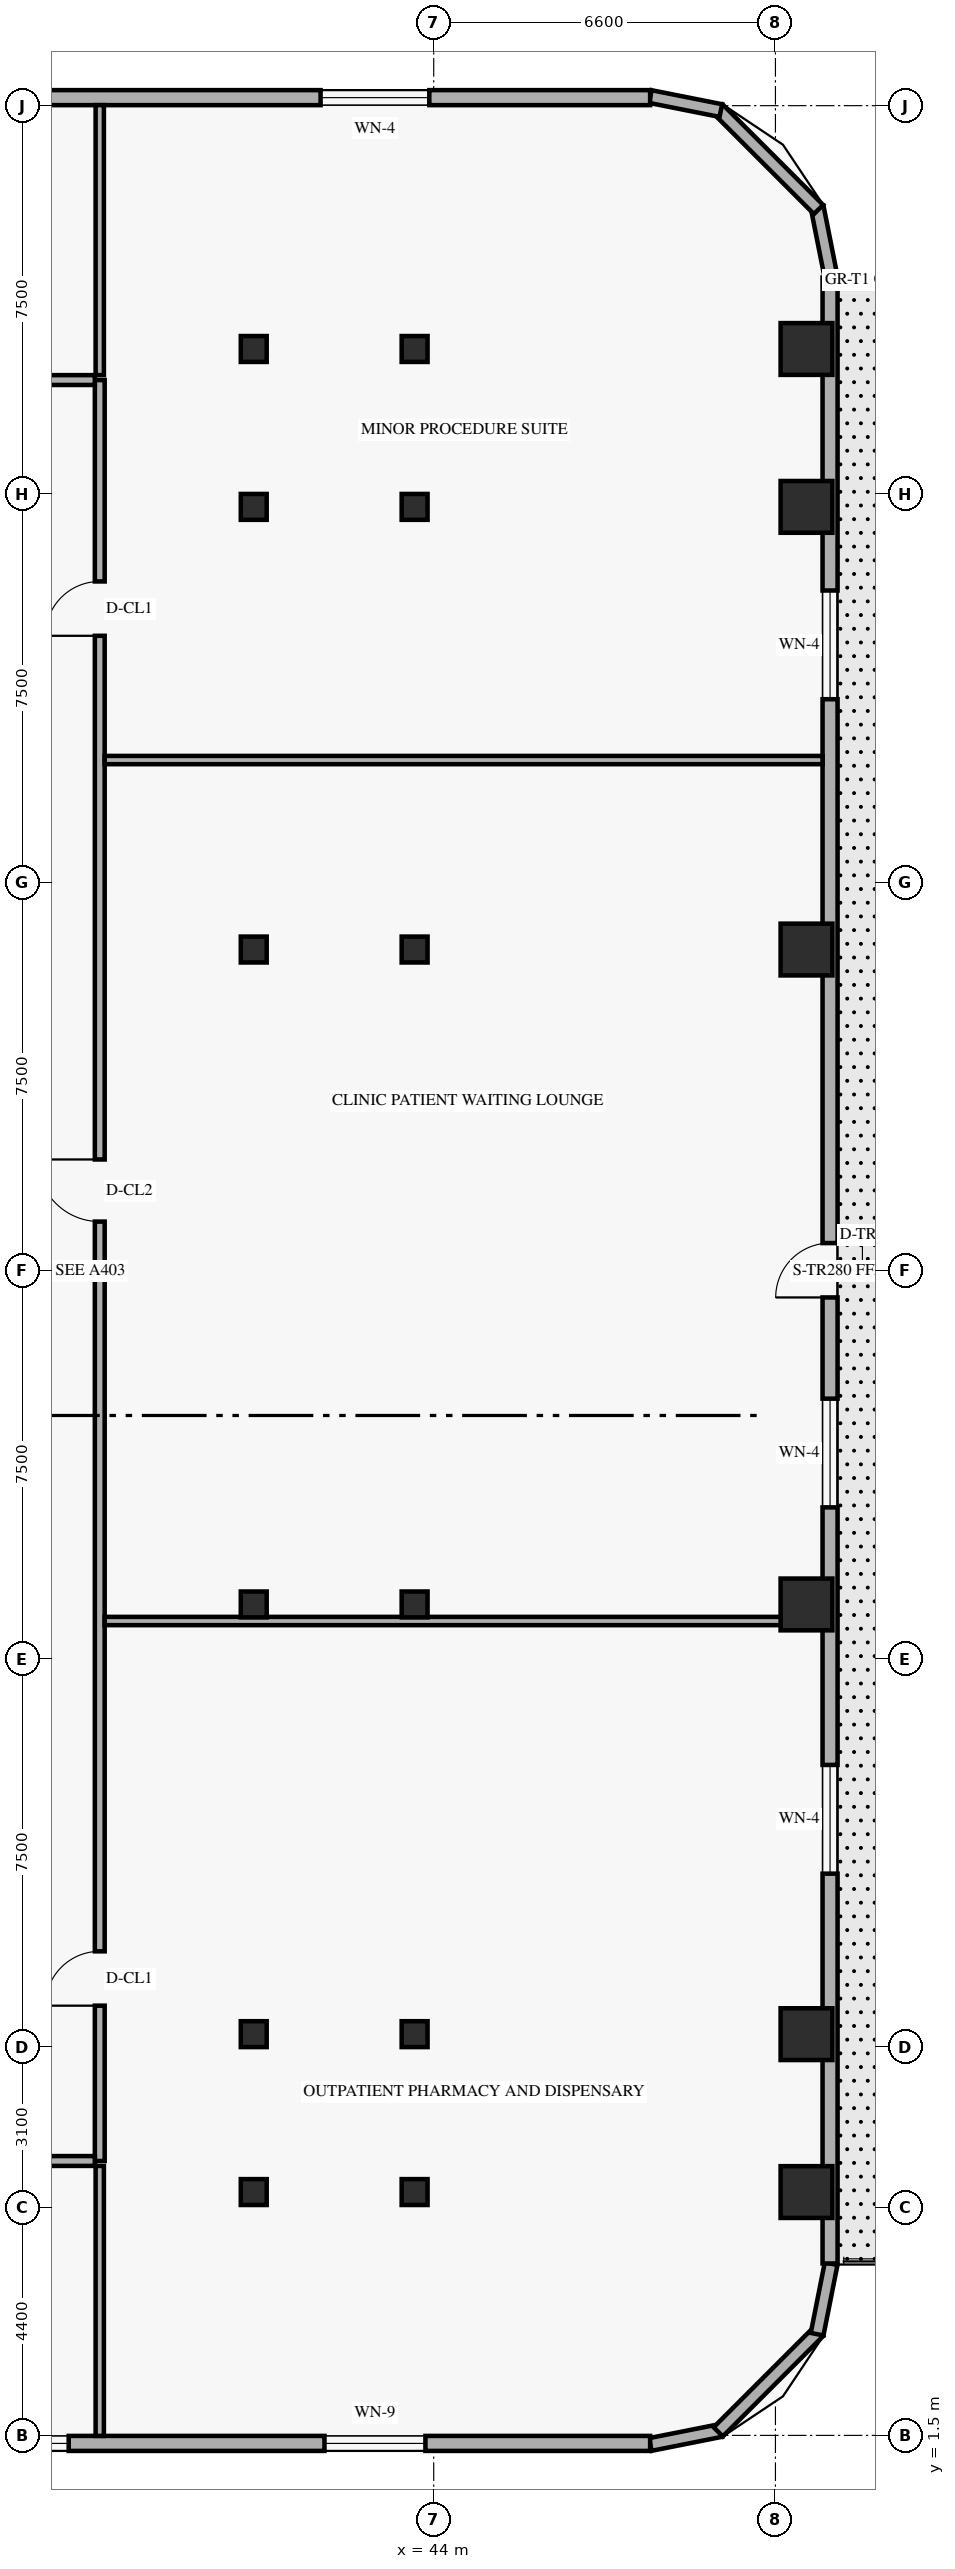
"""IFC4 building model, lengths in metres.
Left out: names, types, materials, properties, quantities, classifications, styles, units other than length and angle.
Written with IfcOpenShell. Run it as: python <this file> out.ifc"""

import sys

from ifc_helpers import new_model, si_unit, direction, frame, frame_2d, origin, origin_2d, place, context, subcontext, project, spatial, rectangle, hollow_rectangle, extrude, element, fill, save


model = new_model("IFC4")
c1 = context("Model", 3, precision=1e-05, world=origin(), true_north=direction((0.0, 1.0)))
c2 = subcontext(c1, "Body", "Model", "MODEL_VIEW")
j1 = project(units=[si_unit("LENGTHUNIT", "METRE"), si_unit("PLANEANGLEUNIT", "RADIAN")], contexts=[c1])
p1 = place(None, origin())
s1 = spatial("IfcSite", under=j1, at=p1, CompositionType="ELEMENT")
p2 = place(p1, origin())
s2 = spatial("IfcBuilding", under=s1, at=p2, CompositionType="ELEMENT")
p3 = place(p2, frame((0.0, 0.0, 14.4)))
s3 = spatial("IfcBuildingStorey", under=s2, at=p3, CompositionType="ELEMENT", Elevation=14.4)
for number, where, z_axis, x_axis in (
    (1, (40.44, 6.2, 0.0), (0.035, 0.0, 0.999), (0.0, 1.0, 0.0)),
    (2, (40.44, 9.25, 0.0), (0.035, 0.0, 0.999), (0.0, 1.0, 0.0)),
    (3, (40.44, 17.55, 0.0), (0.035, 0.0, 0.999), (0.0, 1.0, 0.0)),
    (4, (40.44, 30.2, 0.0), (0.035, 0.0, 0.999), (0.0, 1.0, 0.0)),
    (5, (40.44, 38.75, 0.0), (0.035, 0.0, 0.999), (0.0, 1.0, 0.0)),
    (6, (40.44, 41.8, 0.0), (0.035, 0.0, 0.999), (0.0, 1.0, 0.0)),
):
    element("IfcColumn", number, at=place(p3, frame(where, z_axis=z_axis, x_axis=x_axis)), inside=s3, PredefinedType="COLUMN", context=c2, shape_type="SweptSolid", body=[
        extrude(hollow_rectangle(XDim=0.5, YDim=0.5, WallThickness=0.022, at=origin_2d()), origin(), (0.0, 0.0, 1.0), 4.803),
    ])
for number, where, z_axis, x_axis in (
    (7, (43.492, 6.2, 0.0), (0.058, 0.0, 0.998), (0.0, 1.0, 0.0)),
    (8, (43.492, 9.25, 0.0), (0.058, 0.0, 0.998), (0.0, 1.0, 0.0)),
    (9, (43.492, 17.55, 0.0), (0.058, 0.0, 0.998), (0.0, 1.0, 0.0)),
    (10, (43.492, 30.2, 0.0), (0.058, 0.0, 0.998), (0.0, 1.0, 0.0)),
    (11, (43.492, 38.75, 0.0), (0.058, 0.0, 0.998), (0.0, 1.0, 0.0)),
    (12, (43.492, 41.8, 0.0), (0.058, 0.0, 0.998), (0.0, 1.0, 0.0)),
):
    element("IfcColumn", number, at=place(p3, frame(where, z_axis=z_axis, x_axis=x_axis)), inside=s3, PredefinedType="COLUMN", context=c2, shape_type="SweptSolid", body=[
        extrude(hollow_rectangle(XDim=0.5, YDim=0.5, WallThickness=0.022, at=origin_2d()), origin(), (0.0, 0.0, 1.0), 4.808),
    ])
for number, where, z_axis, x_axis in (
    (13, (51.2, 6.2, 0.0), (0.0, 0.0, 1.0), (1.0, 0.0, 0.0)),
    (14, (51.2, 9.25, 0.0), (0.0, 0.0, 1.0), (1.0, 0.0, 0.0)),
    (15, (51.2, 17.55, 0.0), (0.0, 0.0, 1.0), (1.0, 0.0, 0.0)),
    (16, (51.2, 30.2, 0.0), (0.0, 0.0, 1.0), (1.0, 0.0, 0.0)),
    (17, (51.2, 38.75, 0.0), (0.0, 0.0, 1.0), (1.0, 0.0, 0.0)),
    (18, (51.2, 41.8, 0.0), (0.0, 0.0, 1.0), (1.0, 0.0, 0.0)),
):
    element("IfcColumn", number, at=place(p3, frame(where, z_axis=z_axis, x_axis=x_axis)), inside=s3, PredefinedType="COLUMN", context=c2, shape_type="SweptSolid", body=[
        extrude(rectangle(XDim=1.0, YDim=1.0, at=origin_2d()), origin(), (0.0, 0.0, 1.0), 4.8),
    ])
p4 = place(p3, frame((48.184, 1.324, 0.0), z_axis=(0.0, 0.0, 1.0), x_axis=(0.980803214965, 0.195000137217, 0.0)))
e19 = element("IfcWall", 19, at=p4, inside=s3, PredefinedType="SOLIDWALL", context=c2, shape_type="SweptSolid", body=[
    extrude(rectangle(XDim=1.388, YDim=0.25, at=frame_2d((0.694, 0.0))), origin(), (0.0, 0.0, 1.0), 4.39),
])
p5 = place(p3, frame((49.495, 1.568, 0.0), z_axis=(0.0, 0.0, 1.0), x_axis=(0.707106781187, 0.707106781187, 0.0)))
e20 = element("IfcWall", 20, at=p5, inside=s3, PredefinedType="SOLIDWALL", context=c2, shape_type="SweptSolid", body=[
    extrude(rectangle(XDim=2.739, YDim=0.25, at=frame_2d((1.37, 0.0))), origin(), (0.0, 0.0, 1.0), 4.39),
])
for number, where, z_axis, x_axis in (
    (21, (51.405, 3.455, 0.0), (0.0, 0.0, 1.0), (0.195, 0.981, 0.0)),
    (22, (51.676, 43.184, 0.0), (0.0, 0.0, 1.0), (-0.195, 0.981, 0.0)),
):
    element("IfcWall", number, at=place(p3, frame(where, z_axis=z_axis, x_axis=x_axis)), inside=s3, PredefinedType="SOLIDWALL", context=c2, shape_type="SweptSolid", body=[
        extrude(rectangle(XDim=1.388, YDim=0.25, at=frame_2d((0.694, 0.0))), origin(), (0.0, 0.0, 1.0), 4.39),
    ])
p6 = place(p3, frame((51.432, 44.495, 0.0), z_axis=(0.0, 0.0, 1.0), x_axis=(-0.707106781187, 0.707106781187, 0.0)))
e23 = element("IfcWall", 23, at=p6, inside=s3, PredefinedType="SOLIDWALL", context=c2, shape_type="SweptSolid", body=[
    extrude(rectangle(XDim=2.739, YDim=0.25, at=frame_2d((1.37, 0.0))), origin(), (0.0, 0.0, 1.0), 4.39),
])
p7 = place(p3, frame((49.545, 46.405, 0.0), z_axis=(0.0, 0.0, 1.0), x_axis=(-0.980803214965, 0.195000137217, 0.0)))
e24 = element("IfcWall", 24, at=p7, inside=s3, PredefinedType="SOLIDWALL", context=c2, shape_type="SweptSolid", body=[
    extrude(rectangle(XDim=1.388, YDim=0.25, at=frame_2d((0.694, 0.0))), origin(), (0.0, 0.0, 1.0), 4.39),
])
p8 = place(p3, frame((34.4, 1.345, 0.0), z_axis=(0.0, 0.0, 1.0), x_axis=(1.0, 0.0, 0.0)))
e25 = element("IfcWall", 25, at=p8, inside=s3, PredefinedType="SOLIDWALL", context=c2, shape_type="SweptSolid", body=[
    extrude(rectangle(XDim=13.78, YDim=0.29, at=frame_2d((6.89, 0.0))), origin(), (0.0, 0.0, 1.0), 4.39),
])
p9 = place(p8, frame((0.6, 0.0, 0.85)))
e26 = element("IfcOpeningElement", 26, at=p9, cuts=e25, PredefinedType="OPENING", context=c2, shape_type="SweptSolid", body=[
    extrude(rectangle(XDim=1.95, YDim=1.75, at=frame_2d((0.975, 0.875))), frame((0.0, 0.155, 0.0), z_axis=(0.0, -1.0, 0.0), x_axis=(1.0, 0.0, 0.0)), (0.0, 0.0, 1.0), 0.31),
])
p10 = place(p8, frame((7.49, 0.0, 0.85)))
e27 = element("IfcOpeningElement", 27, at=p10, cuts=e25, PredefinedType="OPENING", context=c2, shape_type="SweptSolid", body=[
    extrude(rectangle(XDim=1.95, YDim=1.75, at=frame_2d((0.975, 0.875))), frame((0.0, 0.155, 0.0), z_axis=(0.0, -1.0, 0.0), x_axis=(1.0, 0.0, 0.0)), (0.0, 0.0, 1.0), 0.31),
])
p11 = place(p3, frame((51.655, 4.82, 0.0), z_axis=(0.0, 0.0, 1.0), x_axis=(0.0, 1.0, 0.0)))
e28 = element("IfcWall", 28, at=p11, inside=s3, PredefinedType="SOLIDWALL", context=c2, shape_type="SweptSolid", body=[
    extrude(rectangle(XDim=38.36, YDim=0.29, at=frame_2d((19.18, 0.0))), origin(), (0.0, 0.0, 1.0), 4.39),
])
p12 = place(p11, frame((18.66, 0.0, 0.0)))
e29 = element("IfcOpeningElement", 29, at=p12, cuts=e28, PredefinedType="OPENING", context=c2, shape_type="SweptSolid", body=[
    extrude(rectangle(XDim=1.05, YDim=2.15, at=frame_2d((0.525, 1.075))), frame((0.0, 0.155, 0.0), z_axis=(0.0, -1.0, 0.0), x_axis=(1.0, 0.0, 0.0)), (0.0, 0.0, 1.0), 0.31),
])
p13 = place(p11, frame((7.53, 0.0, 0.85)))
e30 = element("IfcOpeningElement", 30, at=p13, cuts=e28, PredefinedType="OPENING", context=c2, shape_type="SweptSolid", body=[
    extrude(rectangle(XDim=2.1, YDim=1.75, at=frame_2d((1.05, 0.875))), frame((0.0, 0.155, 0.0), z_axis=(0.0, -1.0, 0.0), x_axis=(1.0, 0.0, 0.0)), (0.0, 0.0, 1.0), 0.31),
])
p14 = place(p11, frame((14.605, 0.0, 0.85)))
e31 = element("IfcOpeningElement", 31, at=p14, cuts=e28, PredefinedType="OPENING", context=c2, shape_type="SweptSolid", body=[
    extrude(rectangle(XDim=2.1, YDim=1.75, at=frame_2d((1.05, 0.875))), frame((0.0, 0.155, 0.0), z_axis=(0.0, -1.0, 0.0), x_axis=(1.0, 0.0, 0.0)), (0.0, 0.0, 1.0), 0.31),
])
p15 = place(p11, frame((30.215, 0.0, 0.85)))
e32 = element("IfcOpeningElement", 32, at=p15, cuts=e28, PredefinedType="OPENING", context=c2, shape_type="SweptSolid", body=[
    extrude(rectangle(XDim=2.1, YDim=1.75, at=frame_2d((1.05, 0.875))), frame((0.0, 0.155, 0.0), z_axis=(0.0, -1.0, 0.0), x_axis=(1.0, 0.0, 0.0)), (0.0, 0.0, 1.0), 0.31),
])
p16 = place(p3, frame((48.18, 46.655, 0.0), z_axis=(0.0, 0.0, 1.0), x_axis=(-1.0, 0.0, 0.0)))
e33 = element("IfcWall", 33, at=p16, inside=s3, PredefinedType="SOLIDWALL", context=c2, shape_type="SweptSolid", body=[
    extrude(rectangle(XDim=42.76, YDim=0.29, at=frame_2d((21.38, 0.0))), origin(), (0.0, 0.0, 1.0), 4.39),
])
p17 = place(p16, frame((38.845, 0.0, 0.85)))
e34 = element("IfcOpeningElement", 34, at=p17, cuts=e33, PredefinedType="OPENING", context=c2, shape_type="SweptSolid", body=[
    extrude(rectangle(XDim=2.1, YDim=1.75, at=frame_2d((1.05, 0.875))), frame((0.0, 0.155, 0.0), z_axis=(0.0, -1.0, 0.0), x_axis=(1.0, 0.0, 0.0)), (0.0, 0.0, 1.0), 0.31),
])
p18 = place(p16, frame((22.78, 0.0, 0.85)))
e35 = element("IfcOpeningElement", 35, at=p18, cuts=e33, PredefinedType="OPENING", context=c2, shape_type="SweptSolid", body=[
    extrude(rectangle(XDim=2.1, YDim=1.75, at=frame_2d((1.05, 0.875))), frame((0.0, 0.155, 0.0), z_axis=(0.0, -1.0, 0.0), x_axis=(1.0, 0.0, 0.0)), (0.0, 0.0, 1.0), 0.31),
])
p19 = place(p16, frame((4.265, 0.0, 0.85)))
e36 = element("IfcOpeningElement", 36, at=p19, cuts=e33, PredefinedType="OPENING", context=c2, shape_type="SweptSolid", body=[
    extrude(rectangle(XDim=2.1, YDim=1.75, at=frame_2d((1.05, 0.875))), frame((0.0, 0.155, 0.0), z_axis=(0.0, -1.0, 0.0), x_axis=(1.0, 0.0, 0.0)), (0.0, 0.0, 1.0), 0.31),
])
p20 = place(p3, frame((37.55, 6.8, 0.0), z_axis=(0.0, 0.0, 1.0), x_axis=(0.0, 1.0, 0.0)))
e37 = element("IfcWall", 37, at=p20, inside=s3, PredefinedType="STANDARD", context=c2, shape_type="SweptSolid", body=[
    extrude(rectangle(XDim=34.4, YDim=0.19, at=frame_2d((17.2, 0.0))), origin(), (0.0, 0.0, 1.0), 3.445),
])
p21 = place(p20, frame((3.0, 0.0, 0.0)))
e38 = element("IfcOpeningElement", 38, at=p21, cuts=e37, PredefinedType="OPENING", context=c2, shape_type="SweptSolid", body=[
    extrude(rectangle(XDim=1.05, YDim=2.15, at=frame_2d((0.525, 1.075))), frame((0.0, 0.105, 0.0), z_axis=(0.0, -1.0, 0.0), x_axis=(1.0, 0.0, 0.0)), (0.0, 0.0, 1.0), 0.21),
])
p22 = place(p20, frame((18.145, 0.0, 0.0)))
e39 = element("IfcOpeningElement", 39, at=p22, cuts=e37, PredefinedType="OPENING", context=c2, shape_type="SweptSolid", body=[
    extrude(rectangle(XDim=1.2, YDim=2.15, at=frame_2d((0.6, 1.075))), frame((0.0, 0.105, 0.0), z_axis=(0.0, -1.0, 0.0), x_axis=(1.0, 0.0, 0.0)), (0.0, 0.0, 1.0), 0.21),
])
p23 = place(p20, frame((29.46, 0.0, 0.0)))
e40 = element("IfcOpeningElement", 40, at=p23, cuts=e37, PredefinedType="OPENING", context=c2, shape_type="SweptSolid", body=[
    extrude(rectangle(XDim=1.05, YDim=2.15, at=frame_2d((0.525, 1.075))), frame((0.0, 0.105, 0.0), z_axis=(0.0, -1.0, 0.0), x_axis=(1.0, 0.0, 0.0)), (0.0, 0.0, 1.0), 0.21),
])
p24 = place(p3, frame((13.0, 6.8, 0.0), z_axis=(0.0, 0.0, 1.0), x_axis=(1.0, 0.0, 0.0)))
e41 = element("IfcWall", 41, at=p24, inside=s3, PredefinedType="STANDARD", context=c2, shape_type="SweptSolid", body=[
    extrude(rectangle(XDim=24.455, YDim=0.19, at=frame_2d((12.228, 0.0))), origin(), (0.0, 0.0, 1.0), 3.602),
])
p25 = place(p24, frame((9.0, 0.0, 0.0)))
e42 = element("IfcOpeningElement", 42, at=p25, cuts=e41, PredefinedType="OPENING", context=c2, shape_type="SweptSolid", body=[
    extrude(rectangle(XDim=0.95, YDim=2.15, at=frame_2d((0.475, 1.075))), frame((0.0, 0.105, 0.0), z_axis=(0.0, -1.0, 0.0), x_axis=(1.0, 0.0, 0.0)), (0.0, 0.0, 1.0), 0.21),
])
p26 = place(p3, frame((13.0, 41.2, 0.0), z_axis=(0.0, 0.0, 1.0), x_axis=(1.0, 0.0, 0.0)))
e43 = element("IfcWall", 43, at=p26, inside=s3, PredefinedType="STANDARD", context=c2, shape_type="SweptSolid", body=[
    extrude(rectangle(XDim=24.455, YDim=0.19, at=frame_2d((12.228, 0.0))), origin(), (0.0, 0.0, 1.0), 3.602),
])
p27 = place(p26, frame((9.0, 0.0, 0.0)))
e44 = element("IfcOpeningElement", 44, at=p27, cuts=e43, PredefinedType="OPENING", context=c2, shape_type="SweptSolid", body=[
    extrude(rectangle(XDim=0.95, YDim=2.15, at=frame_2d((0.475, 1.075))), frame((0.0, 0.105, 0.0), z_axis=(0.0, -1.0, 0.0), x_axis=(1.0, 0.0, 0.0)), (0.0, 0.0, 1.0), 0.21),
])
for number, where, z_axis, x_axis in (
    (45, (37.55, 1.49, 0.0), (0.0, 0.0, 1.0), (0.0, 1.0, 0.0)),
    (46, (37.55, 41.295, 0.0), (0.0, 0.0, 1.0), (0.0, 1.0, 0.0)),
):
    element("IfcWall", number, at=place(p3, frame(where, z_axis=z_axis, x_axis=x_axis)), inside=s3, PredefinedType="PARTITIONING", context=c2, shape_type="SweptSolid", body=[
        extrude(rectangle(XDim=5.215, YDim=0.16, at=frame_2d((2.607, 0.0))), origin(), (0.0, 0.0, 1.0), 3.839),
    ])
for number, where, z_axis, x_axis in (
    (47, (37.645, 17.23, 0.0), (0.0, 0.0, 1.0), (1.0, 0.0, 0.0)),
    (48, (37.645, 33.86, 0.0), (0.0, 0.0, 1.0), (1.0, 0.0, 0.0)),
):
    element("IfcWall", number, at=place(p3, frame(where, z_axis=z_axis, x_axis=x_axis)), inside=s3, PredefinedType="PARTITIONING", context=c2, shape_type="SweptSolid", body=[
        extrude(rectangle(XDim=13.865, YDim=0.16, at=frame_2d((6.933, 0.0))), origin(), (0.0, 0.0, 1.0), 3.602),
    ])
p28 = place(p9, origin())
e49 = element("IfcWindow", 49, at=p28, inside=s3, PartitioningType="SINGLE_PANEL", PredefinedType="WINDOW", context=c2, shape_type="SweptSolid", body=[
    extrude(rectangle(XDim=1.95, YDim=1.75, at=frame_2d((0.975, 0.875))), frame((0.0, 0.03, 0.0), z_axis=(0.0, -1.0, 0.0), x_axis=(1.0, 0.0, 0.0)), (0.0, 0.0, 1.0), 0.06),
])
fill(e26, e49)
p29 = place(p10, origin())
e50 = element("IfcWindow", 50, at=p29, inside=s3, PartitioningType="SINGLE_PANEL", PredefinedType="WINDOW", context=c2, shape_type="SweptSolid", body=[
    extrude(rectangle(XDim=1.95, YDim=1.75, at=frame_2d((0.975, 0.875))), frame((0.0, 0.03, 0.0), z_axis=(0.0, -1.0, 0.0), x_axis=(1.0, 0.0, 0.0)), (0.0, 0.0, 1.0), 0.06),
])
fill(e27, e50)
p30 = place(p12, origin())
e51 = element("IfcDoor", 51, at=p30, inside=s3, OperationType="SINGLE_SWING_LEFT", PredefinedType="DOOR", context=c2, shape_type="SweptSolid", body=[
    extrude(rectangle(XDim=1.05, YDim=2.15, at=frame_2d((0.525, 1.075))), frame((0.0, 0.025, 0.0), z_axis=(0.0, -1.0, 0.0), x_axis=(1.0, 0.0, 0.0)), (0.0, 0.0, 1.0), 0.05),
])
fill(e29, e51)
p31 = place(p13, origin())
e52 = element("IfcWindow", 52, at=p31, inside=s3, PartitioningType="SINGLE_PANEL", PredefinedType="WINDOW", context=c2, shape_type="SweptSolid", body=[
    extrude(rectangle(XDim=2.1, YDim=1.75, at=frame_2d((1.05, 0.875))), frame((0.0, 0.03, 0.0), z_axis=(0.0, -1.0, 0.0), x_axis=(1.0, 0.0, 0.0)), (0.0, 0.0, 1.0), 0.06),
])
fill(e30, e52)
p32 = place(p14, origin())
e53 = element("IfcWindow", 53, at=p32, inside=s3, PartitioningType="SINGLE_PANEL", PredefinedType="WINDOW", context=c2, shape_type="SweptSolid", body=[
    extrude(rectangle(XDim=2.1, YDim=1.75, at=frame_2d((1.05, 0.875))), frame((0.0, 0.03, 0.0), z_axis=(0.0, -1.0, 0.0), x_axis=(1.0, 0.0, 0.0)), (0.0, 0.0, 1.0), 0.06),
])
fill(e31, e53)
p33 = place(p15, origin())
e54 = element("IfcWindow", 54, at=p33, inside=s3, PartitioningType="SINGLE_PANEL", PredefinedType="WINDOW", context=c2, shape_type="SweptSolid", body=[
    extrude(rectangle(XDim=2.1, YDim=1.75, at=frame_2d((1.05, 0.875))), frame((0.0, 0.03, 0.0), z_axis=(0.0, -1.0, 0.0), x_axis=(1.0, 0.0, 0.0)), (0.0, 0.0, 1.0), 0.06),
])
fill(e32, e54)
p34 = place(p19, origin())
e55 = element("IfcWindow", 55, at=p34, inside=s3, PartitioningType="SINGLE_PANEL", PredefinedType="WINDOW", context=c2, shape_type="SweptSolid", body=[
    extrude(rectangle(XDim=2.1, YDim=1.75, at=frame_2d((1.05, 0.875))), frame((0.0, 0.03, 0.0), z_axis=(0.0, -1.0, 0.0), x_axis=(1.0, 0.0, 0.0)), (0.0, 0.0, 1.0), 0.06),
])
fill(e36, e55)
p35 = place(p21, origin())
e56 = element("IfcDoor", 56, at=p35, inside=s3, OperationType="SINGLE_SWING_LEFT", PredefinedType="DOOR", context=c2, shape_type="SweptSolid", body=[
    extrude(rectangle(XDim=1.05, YDim=2.15, at=frame_2d((0.525, 1.075))), frame((0.0, 0.025, 0.0), z_axis=(0.0, -1.0, 0.0), x_axis=(1.0, 0.0, 0.0)), (0.0, 0.0, 1.0), 0.05),
])
fill(e38, e56)
p36 = place(p22, origin())
e57 = element("IfcDoor", 57, at=p36, inside=s3, OperationType="SINGLE_SWING_RIGHT", PredefinedType="DOOR", context=c2, shape_type="SweptSolid", body=[
    extrude(rectangle(XDim=1.2, YDim=2.15, at=frame_2d((0.6, 1.075))), frame((0.0, 0.025, 0.0), z_axis=(0.0, -1.0, 0.0), x_axis=(1.0, 0.0, 0.0)), (0.0, 0.0, 1.0), 0.05),
])
fill(e39, e57)
p37 = place(p23, origin())
e58 = element("IfcDoor", 58, at=p37, inside=s3, OperationType="SINGLE_SWING_LEFT", PredefinedType="DOOR", context=c2, shape_type="SweptSolid", body=[
    extrude(rectangle(XDim=1.05, YDim=2.15, at=frame_2d((0.525, 1.075))), frame((0.0, 0.025, 0.0), z_axis=(0.0, -1.0, 0.0), x_axis=(1.0, 0.0, 0.0)), (0.0, 0.0, 1.0), 0.05),
])
fill(e40, e58)
save(model, sys.argv[1])
